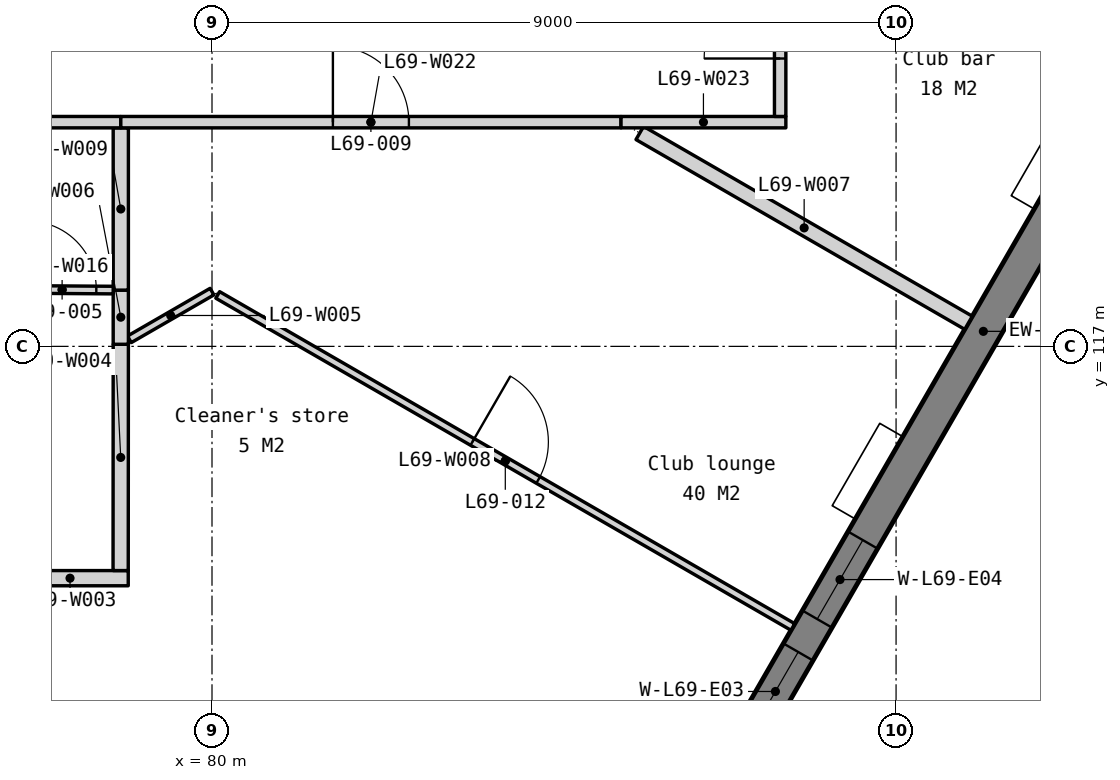
"""IFC4 building model, lengths in metres.
Left out: names, types, materials, properties, quantities, classifications, styles, units other than length and angle.
Written with IfcOpenShell. Run it as: python <this file> out.ifc"""

import sys

from ifc_helpers import new_model, si_unit, direction, frame, frame_2d, origin, place, context, subcontext, project, spatial, polyline, rectangle, outline, extrude, element, fill, save


model = new_model("IFC4")
c1 = context("Model", 3, precision=1e-05, world=origin(), true_north=direction((0.0, 1.0)))
c2 = subcontext(c1, "Body", "Model", "MODEL_VIEW")
j1 = project(units=[si_unit("LENGTHUNIT", "METRE"), si_unit("PLANEANGLEUNIT", "RADIAN")], contexts=[c1])
p1 = place(None, origin())
s1 = spatial("IfcSite", under=j1, at=p1, CompositionType="ELEMENT")
p2 = place(p1, origin())
s2 = spatial("IfcBuilding", under=s1, at=p2, CompositionType="ELEMENT")
p3 = place(p2, frame((0.0, 0.0, 281.6)))
s3 = spatial("IfcBuildingStorey", under=s2, at=p3, CompositionType="ELEMENT", Elevation=281.6)
p4 = place(p3, frame((60.609, 133.207, -0.15), z_axis=(0.0, 0.0, 1.0), x_axis=(0.500002536638, -0.866023939251, 0.0)))
e1 = element("IfcWall", 1, at=p4, inside=s3, PredefinedType="SOLIDWALL", context=c2, shape_type="SweptSolid", body=[
    extrude(outline(polyline([(36.972, 0.0), (36.972, 3.55), (0.0, 3.55), (0.0, 0.0), (36.972, 0.0)])), frame((0.0, 0.225, 0.0), z_axis=(0.0, -1.0, 0.0), x_axis=(1.0, 0.0, 0.0)), (0.0, 0.0, 1.0), 0.45),
])
p5 = place(p4, frame((3.172, 0.0, 0.95)))
e2 = element("IfcOpeningElement", 2, at=p5, cuts=e1, PredefinedType="OPENING", context=c2, shape_type="SweptSolid", body=[
    extrude(rectangle(XDim=1.2, YDim=2.2, at=frame_2d((0.6, 1.1))), frame((0.0, 0.235, 0.0), z_axis=(0.0, -1.0, 0.0), x_axis=(1.0, 0.0, 0.0)), (0.0, 0.0, 1.0), 0.47),
])
p6 = place(p4, frame((4.872, 0.0, 0.95)))
e3 = element("IfcOpeningElement", 3, at=p6, cuts=e1, PredefinedType="OPENING", context=c2, shape_type="SweptSolid", body=[
    extrude(rectangle(XDim=1.2, YDim=2.2, at=frame_2d((0.6, 1.1))), frame((0.0, 0.235, 0.0), z_axis=(0.0, -1.0, 0.0), x_axis=(1.0, 0.0, 0.0)), (0.0, 0.0, 1.0), 0.47),
])
p7 = place(p4, frame((12.415, 0.0, 0.95)))
e4 = element("IfcOpeningElement", 4, at=p7, cuts=e1, PredefinedType="OPENING", context=c2, shape_type="SweptSolid", body=[
    extrude(rectangle(XDim=1.2, YDim=2.2, at=frame_2d((0.6, 1.1))), frame((0.0, 0.235, 0.0), z_axis=(0.0, -1.0, 0.0), x_axis=(1.0, 0.0, 0.0)), (0.0, 0.0, 1.0), 0.47),
])
p8 = place(p4, frame((14.115, 0.0, 0.95)))
e5 = element("IfcOpeningElement", 5, at=p8, cuts=e1, PredefinedType="OPENING", context=c2, shape_type="SweptSolid", body=[
    extrude(rectangle(XDim=1.2, YDim=2.2, at=frame_2d((0.6, 1.1))), frame((0.0, 0.235, 0.0), z_axis=(0.0, -1.0, 0.0), x_axis=(1.0, 0.0, 0.0)), (0.0, 0.0, 1.0), 0.47),
])
p9 = place(p4, frame((21.658, 0.0, 0.95)))
e6 = element("IfcOpeningElement", 6, at=p9, cuts=e1, PredefinedType="OPENING", context=c2, shape_type="SweptSolid", body=[
    extrude(rectangle(XDim=1.2, YDim=2.2, at=frame_2d((0.6, 1.1))), frame((0.0, 0.235, 0.0), z_axis=(0.0, -1.0, 0.0), x_axis=(1.0, 0.0, 0.0)), (0.0, 0.0, 1.0), 0.47),
])
p10 = place(p4, frame((23.358, 0.0, 0.95)))
e7 = element("IfcOpeningElement", 7, at=p10, cuts=e1, PredefinedType="OPENING", context=c2, shape_type="SweptSolid", body=[
    extrude(rectangle(XDim=1.2, YDim=2.2, at=frame_2d((0.6, 1.1))), frame((0.0, 0.235, 0.0), z_axis=(0.0, -1.0, 0.0), x_axis=(1.0, 0.0, 0.0)), (0.0, 0.0, 1.0), 0.47),
])
p11 = place(p4, frame((30.901, 0.0, 0.95)))
e8 = element("IfcOpeningElement", 8, at=p11, cuts=e1, PredefinedType="OPENING", context=c2, shape_type="SweptSolid", body=[
    extrude(rectangle(XDim=1.2, YDim=2.2, at=frame_2d((0.6, 1.1))), frame((0.0, 0.235, 0.0), z_axis=(0.0, -1.0, 0.0), x_axis=(1.0, 0.0, 0.0)), (0.0, 0.0, 1.0), 0.47),
])
p12 = place(p4, frame((32.601, 0.0, 0.95)))
e9 = element("IfcOpeningElement", 9, at=p12, cuts=e1, PredefinedType="OPENING", context=c2, shape_type="SweptSolid", body=[
    extrude(rectangle(XDim=1.2, YDim=2.2, at=frame_2d((0.6, 1.1))), frame((0.0, 0.235, 0.0), z_axis=(0.0, -1.0, 0.0), x_axis=(1.0, 0.0, 0.0)), (0.0, 0.0, 1.0), 0.47),
])
p13 = place(p3, frame((80.905, 101.188, -0.15), z_axis=(0.0, 0.0, 1.0), x_axis=(0.500002536638, 0.866023939251, 0.0)))
e10 = element("IfcWall", 10, at=p13, inside=s3, PredefinedType="SOLIDWALL", context=c2, shape_type="SweptSolid", body=[
    extrude(outline(polyline([(36.972, 0.0), (36.972, 3.55), (0.0, 3.55), (0.0, 0.0), (36.972, 0.0)])), frame((0.0, 0.225, 0.0), z_axis=(0.0, -1.0, 0.0), x_axis=(1.0, 0.0, 0.0)), (0.0, 0.0, 1.0), 0.45),
])
p14 = place(p13, frame((3.172, 0.0, 0.95)))
e11 = element("IfcOpeningElement", 11, at=p14, cuts=e10, PredefinedType="OPENING", context=c2, shape_type="SweptSolid", body=[
    extrude(rectangle(XDim=1.2, YDim=2.2, at=frame_2d((0.6, 1.1))), frame((0.0, 0.235, 0.0), z_axis=(0.0, -1.0, 0.0), x_axis=(1.0, 0.0, 0.0)), (0.0, 0.0, 1.0), 0.47),
])
p15 = place(p13, frame((4.872, 0.0, 0.95)))
e12 = element("IfcOpeningElement", 12, at=p15, cuts=e10, PredefinedType="OPENING", context=c2, shape_type="SweptSolid", body=[
    extrude(rectangle(XDim=1.2, YDim=2.2, at=frame_2d((0.6, 1.1))), frame((0.0, 0.235, 0.0), z_axis=(0.0, -1.0, 0.0), x_axis=(1.0, 0.0, 0.0)), (0.0, 0.0, 1.0), 0.47),
])
p16 = place(p13, frame((12.415, 0.0, 0.95)))
e13 = element("IfcOpeningElement", 13, at=p16, cuts=e10, PredefinedType="OPENING", context=c2, shape_type="SweptSolid", body=[
    extrude(rectangle(XDim=1.2, YDim=2.2, at=frame_2d((0.6, 1.1))), frame((0.0, 0.235, 0.0), z_axis=(0.0, -1.0, 0.0), x_axis=(1.0, 0.0, 0.0)), (0.0, 0.0, 1.0), 0.47),
])
p17 = place(p13, frame((14.115, 0.0, 0.95)))
e14 = element("IfcOpeningElement", 14, at=p17, cuts=e10, PredefinedType="OPENING", context=c2, shape_type="SweptSolid", body=[
    extrude(rectangle(XDim=1.2, YDim=2.2, at=frame_2d((0.6, 1.1))), frame((0.0, 0.235, 0.0), z_axis=(0.0, -1.0, 0.0), x_axis=(1.0, 0.0, 0.0)), (0.0, 0.0, 1.0), 0.47),
])
p18 = place(p13, frame((21.658, 0.0, 0.95)))
e15 = element("IfcOpeningElement", 15, at=p18, cuts=e10, PredefinedType="OPENING", context=c2, shape_type="SweptSolid", body=[
    extrude(rectangle(XDim=1.2, YDim=2.2, at=frame_2d((0.6, 1.1))), frame((0.0, 0.235, 0.0), z_axis=(0.0, -1.0, 0.0), x_axis=(1.0, 0.0, 0.0)), (0.0, 0.0, 1.0), 0.47),
])
p19 = place(p13, frame((23.358, 0.0, 0.95)))
e16 = element("IfcOpeningElement", 16, at=p19, cuts=e10, PredefinedType="OPENING", context=c2, shape_type="SweptSolid", body=[
    extrude(rectangle(XDim=1.2, YDim=2.2, at=frame_2d((0.6, 1.1))), frame((0.0, 0.235, 0.0), z_axis=(0.0, -1.0, 0.0), x_axis=(1.0, 0.0, 0.0)), (0.0, 0.0, 1.0), 0.47),
])
p20 = place(p13, frame((30.901, 0.0, 0.95)))
e17 = element("IfcOpeningElement", 17, at=p20, cuts=e10, PredefinedType="OPENING", context=c2, shape_type="SweptSolid", body=[
    extrude(rectangle(XDim=1.2, YDim=2.2, at=frame_2d((0.6, 1.1))), frame((0.0, 0.235, 0.0), z_axis=(0.0, -1.0, 0.0), x_axis=(1.0, 0.0, 0.0)), (0.0, 0.0, 1.0), 0.47),
])
p21 = place(p13, frame((32.601, 0.0, 0.95)))
e18 = element("IfcOpeningElement", 18, at=p21, cuts=e10, PredefinedType="OPENING", context=c2, shape_type="SweptSolid", body=[
    extrude(rectangle(XDim=1.2, YDim=2.2, at=frame_2d((0.6, 1.1))), frame((0.0, 0.235, 0.0), z_axis=(0.0, -1.0, 0.0), x_axis=(1.0, 0.0, 0.0)), (0.0, 0.0, 1.0), 0.47),
])
p22 = place(p3, frame((77.366, 113.95, 0.0), z_axis=(0.0, 0.0, 1.0), x_axis=(1.0, 0.0, 0.0)))
e19 = element("IfcWall", 19, at=p22, inside=s3, PredefinedType="PARTITIONING", context=c2, shape_type="SweptSolid", body=[
    extrude(rectangle(XDim=1.532, YDim=0.2, at=frame_2d((0.766, 0.0))), origin(), (0.0, 0.0, 1.0), 3.5),
])
p23 = place(p3, frame((78.798, 114.05, 0.0), z_axis=(0.0, 0.0, 1.0), x_axis=(0.00065595263, 0.999999784863, 0.0)))
e20 = element("IfcWall", 20, at=p23, inside=s3, PredefinedType="PARTITIONING", context=c2, shape_type="SweptSolid", body=[
    extrude(rectangle(XDim=2.978, YDim=0.2, at=frame_2d((1.489, 0.0))), origin(), (0.0, 0.0, 1.0), 3.5),
])
p24 = place(p3, frame((78.913, 117.093, 0.0), z_axis=(0.0, 0.0, 1.0), x_axis=(0.866069023501, 0.499924440822, 0.0)))
e21 = element("IfcWall", 21, at=p24, inside=s3, PredefinedType="PARTITIONING", context=c2, shape_type="SweptSolid", body=[
    extrude(rectangle(XDim=1.256, YDim=0.1, at=frame_2d((0.628, 0.0))), origin(), (0.0, 0.0, 1.0), 3.5),
])
p25 = place(p3, frame((78.8, 117.028, 0.0), z_axis=(0.0, 0.0, 1.0), x_axis=(0.0, 1.0, 0.0)))
e22 = element("IfcWall", 22, at=p25, inside=s3, PredefinedType="PARTITIONING", context=c2, shape_type="SweptSolid", body=[
    extrude(rectangle(XDim=0.712, YDim=0.2, at=frame_2d((0.356, 0.0))), origin(), (0.0, 0.0, 1.0), 3.5),
])
p26 = place(p3, frame((85.628, 119.808, 0.0), z_axis=(0.0, 0.0, 1.0), x_axis=(0.86602359872, -0.50000312645, 0.0)))
e23 = element("IfcWall", 23, at=p26, inside=s3, PredefinedType="PARTITIONING", context=c2, shape_type="SweptSolid", body=[
    extrude(rectangle(XDim=4.995, YDim=0.2, at=frame_2d((2.497, 0.0))), origin(), (0.0, 0.0, 1.0), 3.5),
])
p27 = place(p3, frame((80.075, 117.677, 0.0), z_axis=(0.0, 0.0, 1.0), x_axis=(0.866026931682, -0.499997353595, 0.0)))
e24 = element("IfcWall", 24, at=p27, inside=s3, PredefinedType="PARTITIONING", context=c2, shape_type="SweptSolid", body=[
    extrude(rectangle(XDim=8.738, YDim=0.1, at=frame_2d((4.369, 0.0))), origin(), (0.0, 0.0, 1.0), 3.5),
])
p28 = place(p27, frame((3.869, 0.0, 0.0)))
e25 = element("IfcOpeningElement", 25, at=p28, cuts=e24, PredefinedType="OPENING", context=c2, shape_type="SweptSolid", body=[
    extrude(rectangle(XDim=1.0, YDim=2.1, at=frame_2d((0.5, 1.05))), frame((0.0, 0.06, 0.0), z_axis=(0.0, -1.0, 0.0), x_axis=(1.0, 0.0, 0.0)), (0.0, 0.0, 1.0), 0.12),
])
p29 = place(p3, frame((78.8, 117.74, 0.0), z_axis=(0.0, 0.0, 1.0), x_axis=(0.0, 1.0, 0.0)))
e26 = element("IfcWall", 26, at=p29, inside=s3, PredefinedType="PARTITIONING", context=c2, shape_type="SweptSolid", body=[
    extrude(rectangle(XDim=2.135, YDim=0.2, at=frame_2d((1.067, 0.0))), origin(), (0.0, 0.0, 1.0), 3.5),
])
p30 = place(p3, frame((77.356, 117.75, 0.0), z_axis=(0.0, 0.0, 1.0), x_axis=(0.99997617642, -0.006902651172, 0.0)))
e27 = element("IfcWall", 27, at=p30, inside=s3, PredefinedType="PARTITIONING", context=c2, shape_type="SweptSolid", body=[
    extrude(rectangle(XDim=1.344, YDim=0.1, at=frame_2d((0.672, 0.0))), origin(), (0.0, 0.0, 1.0), 3.5),
])
p31 = place(p30, frame((0.222, 0.0, 0.0)))
e28 = element("IfcOpeningElement", 28, at=p31, cuts=e27, PredefinedType="OPENING", context=c2, shape_type="SweptSolid", body=[
    extrude(rectangle(XDim=0.9, YDim=2.1, at=frame_2d((0.45, 1.05))), frame((0.0, 0.06, 0.0), z_axis=(0.0, -1.0, 0.0), x_axis=(1.0, 0.0, 0.0)), (0.0, 0.0, 1.0), 0.12),
])
p32 = place(p3, frame((72.525, 119.95, 0.0), z_axis=(0.0, 0.0, 1.0), x_axis=(1.0, 0.0, 0.0)))
e29 = element("IfcWall", 29, at=p32, inside=s3, PredefinedType="PARTITIONING", context=c2, shape_type="SweptSolid", body=[
    extrude(rectangle(XDim=6.275, YDim=0.15, at=frame_2d((3.138, 0.0))), origin(), (0.0, 0.0, 1.0), 3.5),
])
p33 = place(p32, frame((2.637, 0.0, 0.0)))
e30 = element("IfcOpeningElement", 30, at=p33, cuts=e29, PredefinedType="OPENING", context=c2, shape_type="SweptSolid", body=[
    extrude(rectangle(XDim=1.0, YDim=2.1, at=frame_2d((0.5, 1.05))), frame((0.0, 0.085, 0.0), z_axis=(0.0, -1.0, 0.0), x_axis=(1.0, 0.0, 0.0)), (0.0, 0.0, 1.0), 0.17),
])
p34 = place(p3, frame((78.8, 119.95, 0.0), z_axis=(0.0, 0.0, 1.0), x_axis=(1.0, 0.0, 0.0)))
e31 = element("IfcWall", 31, at=p34, inside=s3, PredefinedType="PARTITIONING", context=c2, shape_type="SweptSolid", body=[
    extrude(rectangle(XDim=6.581, YDim=0.15, at=frame_2d((3.291, 0.0))), origin(), (0.0, 0.0, 1.0), 3.5),
])
p35 = place(p34, frame((2.791, 0.0, 0.0)))
e32 = element("IfcOpeningElement", 32, at=p35, cuts=e31, PredefinedType="OPENING", context=c2, shape_type="SweptSolid", body=[
    extrude(rectangle(XDim=1.0, YDim=2.1, at=frame_2d((0.5, 1.05))), frame((0.0, 0.085, 0.0), z_axis=(0.0, -1.0, 0.0), x_axis=(1.0, 0.0, 0.0)), (0.0, 0.0, 1.0), 0.17),
])
p36 = place(p3, frame((85.381, 119.95, 0.0), z_axis=(0.0, 0.0, 1.0), x_axis=(1.0, 0.0, 0.0)))
e33 = element("IfcWall", 33, at=p36, inside=s3, PredefinedType="PARTITIONING", context=c2, shape_type="SweptSolid", body=[
    extrude(rectangle(XDim=2.169, YDim=0.15, at=frame_2d((1.084, 0.0))), origin(), (0.0, 0.0, 1.0), 3.5),
])
p37 = place(p3, frame((87.475, 120.025, 0.0), z_axis=(0.0, 0.0, 1.0), x_axis=(0.0, 1.0, 0.0)))
e34 = element("IfcWall", 34, at=p37, inside=s3, PredefinedType="PARTITIONING", context=c2, shape_type="SweptSolid", body=[
    extrude(rectangle(XDim=2.525, YDim=0.15, at=frame_2d((1.263, 0.0))), origin(), (0.0, 0.0, 1.0), 3.5),
])
p38 = place(p37, frame((0.762, 0.0, 0.0)))
e35 = element("IfcOpeningElement", 35, at=p38, cuts=e34, PredefinedType="OPENING", context=c2, shape_type="SweptSolid", body=[
    extrude(rectangle(XDim=1.0, YDim=2.1, at=frame_2d((0.5, 1.05))), frame((0.0, 0.085, 0.0), z_axis=(0.0, -1.0, 0.0), x_axis=(1.0, 0.0, 0.0)), (0.0, 0.0, 1.0), 0.17),
])
p39 = place(p16, origin())
e36 = element("IfcWindow", 36, at=p39, inside=s3, PartitioningType="SINGLE_PANEL", PredefinedType="WINDOW", context=c2, shape_type="SweptSolid", body=[
    extrude(rectangle(XDim=1.2, YDim=2.2, at=frame_2d((0.6, 1.1))), frame((0.0, 0.03, 0.0), z_axis=(0.0, -1.0, 0.0), x_axis=(1.0, 0.0, 0.0)), (0.0, 0.0, 1.0), 0.06),
])
fill(e13, e36)
p40 = place(p17, origin())
e37 = element("IfcWindow", 37, at=p40, inside=s3, PartitioningType="SINGLE_PANEL", PredefinedType="WINDOW", context=c2, shape_type="SweptSolid", body=[
    extrude(rectangle(XDim=1.2, YDim=2.2, at=frame_2d((0.6, 1.1))), frame((0.0, 0.03, 0.0), z_axis=(0.0, -1.0, 0.0), x_axis=(1.0, 0.0, 0.0)), (0.0, 0.0, 1.0), 0.06),
])
fill(e14, e37)
p41 = place(p31, origin())
e38 = element("IfcDoor", 38, at=p41, inside=s3, OperationType="SINGLE_SWING_LEFT", PredefinedType="DOOR", context=c2, shape_type="SweptSolid", body=[
    extrude(rectangle(XDim=0.9, YDim=2.1, at=frame_2d((0.45, 1.05))), frame((0.0, 0.025, 0.0), z_axis=(0.0, -1.0, 0.0), x_axis=(1.0, 0.0, 0.0)), (0.0, 0.0, 1.0), 0.05),
])
fill(e28, e38)
p42 = place(p35, origin())
e39 = element("IfcDoor", 39, at=p42, inside=s3, OperationType="SINGLE_SWING_LEFT", PredefinedType="DOOR", context=c2, shape_type="SweptSolid", body=[
    extrude(rectangle(XDim=1.0, YDim=2.1, at=frame_2d((0.5, 1.05))), frame((0.0, 0.025, 0.0), z_axis=(0.0, -1.0, 0.0), x_axis=(1.0, 0.0, 0.0)), (0.0, 0.0, 1.0), 0.05),
])
fill(e32, e39)
p43 = place(p38, origin())
e40 = element("IfcDoor", 40, at=p43, inside=s3, OperationType="SINGLE_SWING_LEFT", PredefinedType="DOOR", context=c2, shape_type="SweptSolid", body=[
    extrude(rectangle(XDim=1.0, YDim=2.1, at=frame_2d((0.5, 1.05))), frame((0.0, 0.025, 0.0), z_axis=(0.0, -1.0, 0.0), x_axis=(1.0, 0.0, 0.0)), (0.0, 0.0, 1.0), 0.05),
])
fill(e35, e40)
p44 = place(p28, origin())
e41 = element("IfcDoor", 41, at=p44, inside=s3, OperationType="SINGLE_SWING_LEFT", PredefinedType="DOOR", context=c2, shape_type="SweptSolid", body=[
    extrude(rectangle(XDim=1.0, YDim=2.1, at=frame_2d((0.5, 1.05))), frame((0.0, 0.025, 0.0), z_axis=(0.0, -1.0, 0.0), x_axis=(1.0, 0.0, 0.0)), (0.0, 0.0, 1.0), 0.05),
])
fill(e25, e41)
save(model, sys.argv[1])
